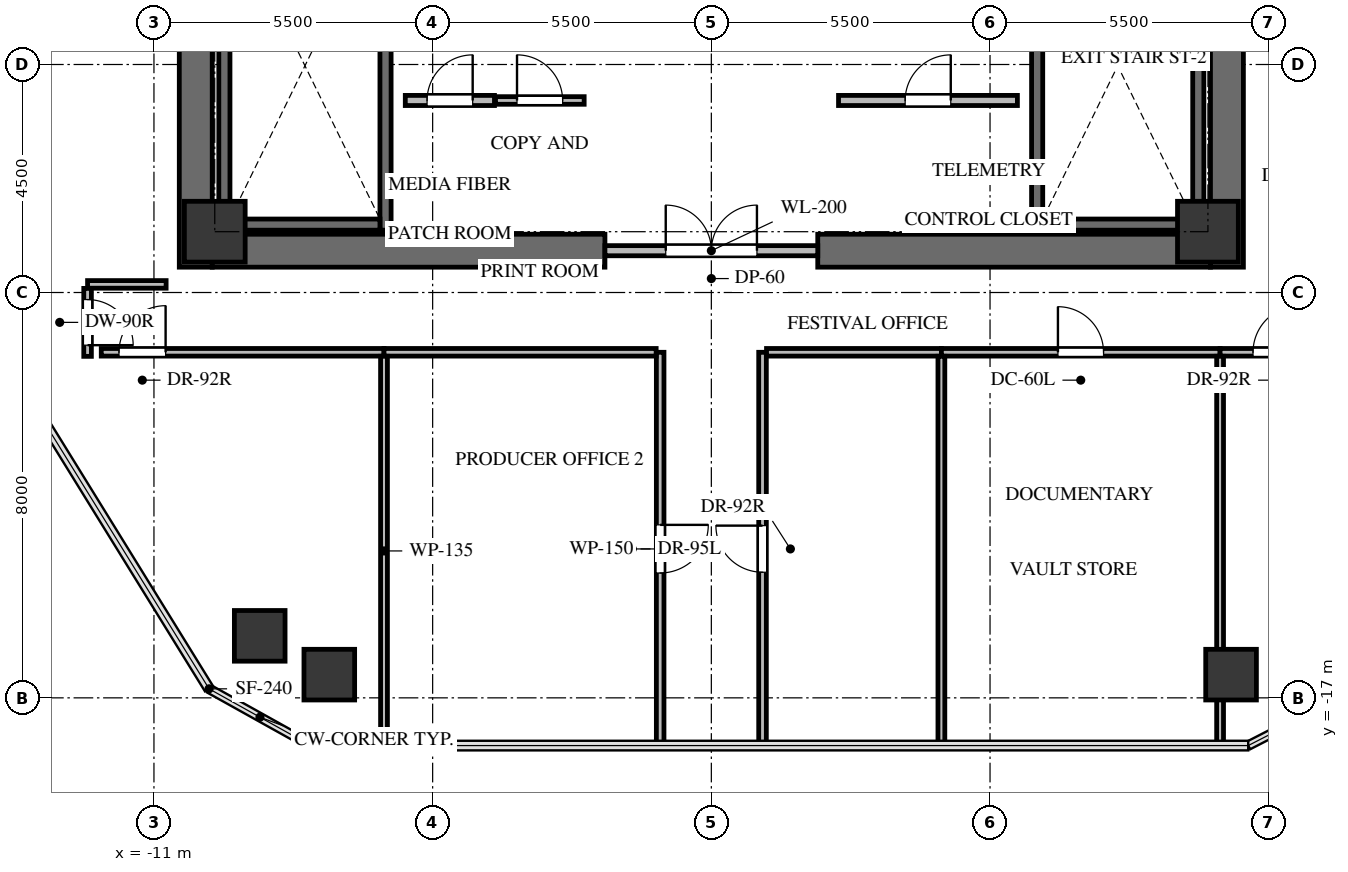
"""IFC4 building model, lengths in metres.
Left out: names, types, materials, properties, quantities, classifications, styles, units other than length and angle.
Written with IfcOpenShell. Run it as: python <this file> out.ifc"""

import sys

from ifc_helpers import new_model, si_unit, direction, frame, frame_2d, origin, origin_2d, place, context, subcontext, project, spatial, rectangle, extrude, source, transform, mapped, element, fill, save


model = new_model("IFC4")
c1 = context("Model", 3, precision=1e-05, world=origin(), true_north=direction((0.0, 1.0)))
c2 = subcontext(c1, "Body", "Model", "MODEL_VIEW")
j1 = project(units=[si_unit("LENGTHUNIT", "METRE"), si_unit("PLANEANGLEUNIT", "RADIAN")], contexts=[c1])
p1 = place(None, origin())
s1 = spatial("IfcSite", under=j1, at=p1, CompositionType="ELEMENT")
p2 = place(p1, origin())
s2 = spatial("IfcBuilding", under=s1, at=p2, CompositionType="ELEMENT")
p3 = place(p2, frame((0.0, 0.0, 180.4)))
s3 = spatial("IfcBuildingStorey", under=s2, at=p3, CompositionType="ELEMENT", Elevation=180.4)
for number, where, z_axis, x_axis in (
    (1, (-10.175, -8.5, 0.0), (0.0, 0.0, 1.0), (0.0, 1.0, 0.0)),
    (2, (10.175, -8.5, 0.0), (0.0, 0.0, 1.0), (0.0, 1.0, 0.0)),
):
    element("IfcWall", number, at=place(p3, frame(where, z_axis=z_axis, x_axis=x_axis)), inside=s3, PredefinedType="SHEAR", context=c2, shape_type="SweptSolid", body=[
        extrude(rectangle(XDim=17.0, YDim=0.65, at=frame_2d((8.5, 0.0))), origin(), (0.0, 0.0, 1.0), 3.3),
    ])
for number, where, z_axis, x_axis in (
    (3, (-9.85, -8.175, 0.0), (0.0, 0.0, 1.0), (1.0, 0.0, 0.0)),
    (4, (2.1, -8.175, 0.0), (0.0, 0.0, 1.0), (1.0, 0.0, 0.0)),
):
    element("IfcWall", number, at=place(p3, frame(where, z_axis=z_axis, x_axis=x_axis)), inside=s3, PredefinedType="SHEAR", context=c2, shape_type="SweptSolid", body=[
        extrude(rectangle(XDim=7.75, YDim=0.65, at=frame_2d((3.875, 0.0))), origin(), (0.0, 0.0, 1.0), 3.3),
    ])
p4 = place(p3, frame((-6.43, -7.77, -0.24), z_axis=(0.0, 0.0, 1.0), x_axis=(0.0, 1.0, 0.0)))
e5 = element("IfcWall", 5, at=p4, inside=s3, PredefinedType="SHEAR", context=c2, shape_type="SweptSolid", body=[
    extrude(rectangle(XDim=7.89, YDim=0.22, at=frame_2d((3.945, 0.0))), origin(), (0.0, 0.0, 1.0), 3.3),
])
p5 = place(p4, frame((6.32, 0.0, 0.0)))
e6 = element("IfcOpeningElement", 6, at=p5, cuts=e5, PredefinedType="OPENING", context=c2, shape_type="SweptSolid", body=[
    extrude(rectangle(XDim=1.05, YDim=2.15, at=frame_2d((0.525, 1.075))), frame((0.0, 0.12, 0.0), z_axis=(0.0, -1.0, 0.0), x_axis=(1.0, 0.0, 0.0)), (0.0, 0.0, 1.0), 0.24),
])
p6 = place(p3, frame((-9.61, 0.12, -0.24), z_axis=(0.0, 0.0, 1.0), x_axis=(0.0, -1.0, 0.0)))
e7 = element("IfcWall", 7, at=p6, inside=s3, PredefinedType="SHEAR", context=c2, shape_type="SweptSolid", body=[
    extrude(rectangle(XDim=7.89, YDim=0.22, at=frame_2d((3.945, 0.0))), origin(), (0.0, 0.0, 1.0), 3.3),
])
p7 = place(p3, frame((-9.5, -7.66, -0.24), z_axis=(0.0, 0.0, 1.0), x_axis=(1.0, 0.0, 0.0)))
e8 = element("IfcWall", 8, at=p7, inside=s3, PredefinedType="SHEAR", context=c2, shape_type="SweptSolid", body=[
    extrude(rectangle(XDim=2.96, YDim=0.22, at=frame_2d((1.48, 0.0))), origin(), (0.0, 0.0, 1.0), 3.3),
])
p8 = place(p3, frame((9.61, -7.77, -0.24), z_axis=(0.0, 0.0, 1.0), x_axis=(0.0, 1.0, 0.0)))
e9 = element("IfcWall", 9, at=p8, inside=s3, PredefinedType="SHEAR", context=c2, shape_type="SweptSolid", body=[
    extrude(rectangle(XDim=7.89, YDim=0.22, at=frame_2d((3.945, 0.0))), origin(), (0.0, 0.0, 1.0), 3.3),
])
p9 = place(p3, frame((6.43, 0.12, -0.24), z_axis=(0.0, 0.0, 1.0), x_axis=(0.0, -1.0, 0.0)))
e10 = element("IfcWall", 10, at=p9, inside=s3, PredefinedType="SHEAR", context=c2, shape_type="SweptSolid", body=[
    extrude(rectangle(XDim=7.89, YDim=0.22, at=frame_2d((3.945, 0.0))), origin(), (0.0, 0.0, 1.0), 3.3),
])
p10 = place(p9, frame((0.52, 0.0, 0.0)))
e11 = element("IfcOpeningElement", 11, at=p10, cuts=e10, PredefinedType="OPENING", context=c2, shape_type="SweptSolid", body=[
    extrude(rectangle(XDim=1.05, YDim=2.15, at=frame_2d((0.525, 1.075))), frame((0.0, 0.12, 0.0), z_axis=(0.0, -1.0, 0.0), x_axis=(1.0, 0.0, 0.0)), (0.0, 0.0, 1.0), 0.24),
])
p11 = place(p3, frame((6.54, -7.66, -0.24), z_axis=(0.0, 0.0, 1.0), x_axis=(1.0, 0.0, 0.0)))
e12 = element("IfcWall", 12, at=p11, inside=s3, PredefinedType="SHEAR", context=c2, shape_type="SweptSolid", body=[
    extrude(rectangle(XDim=2.96, YDim=0.22, at=frame_2d((1.48, 0.0))), origin(), (0.0, 0.0, 1.0), 3.3),
])
m1 = source(origin(), c2, "Body", "SweptSolid", [
    extrude(rectangle(XDim=1.2, YDim=1.2, at=origin_2d()), origin(), (0.0, 0.0, 1.0), 3.3),
])
for number, where, z_axis, x_axis in (
    (13, (-9.8, -7.8, -0.24), (0.0, 0.0, 1.0), (1.0, 0.0, 0.0)),
    (14, (9.8, -7.8, -0.24), (0.0, 0.0, 1.0), (1.0, 0.0, 0.0)),
):
    element("IfcColumn", number, at=place(p3, frame(where, z_axis=z_axis, x_axis=x_axis)), inside=s3, PredefinedType="COLUMN", context=c2, shape_type="MappedRepresentation", body=[
        mapped(m1, transform((0.0, 0.0, 0.0), x_axis=(1.0, 0.0, 0.0), y_axis=(0.0, 1.0, 0.0), z_axis=(0.0, 0.0, 1.0), scale=1.0)),
    ])
m2 = source(origin(), c2, "Body", "SweptSolid", [
    extrude(rectangle(XDim=1.0, YDim=1.0, at=origin_2d()), origin(), (0.0, 0.0, 1.0), 3.3),
])
for number, where, z_axis, x_axis in (
    (15, (-8.913, -15.776, -0.24), (0.0, 0.0, 1.0), (1.0, 0.0, 0.0)),
    (16, (10.257, -16.542, -0.24), (0.0, 0.0, 1.0), (1.0, 0.0, 0.0)),
    (17, (-7.54, -16.542, -0.24), (0.0, 0.0, 1.0), (1.0, 0.0, 0.0)),
):
    element("IfcColumn", number, at=place(p3, frame(where, z_axis=z_axis, x_axis=x_axis)), inside=s3, PredefinedType="COLUMN", context=c2, shape_type="MappedRepresentation", body=[
        mapped(m2, transform((0.0, 0.0, 0.0), x_axis=(1.0, 0.0, 0.0), y_axis=(0.0, 1.0, 0.0), z_axis=(0.0, 0.0, 1.0), scale=1.0)),
    ])
p12 = place(p3, frame((-2.1, -8.175, 0.0), z_axis=(0.0, 0.0, 1.0), x_axis=(1.0, 0.0, 0.0)))
e18 = element("IfcWall", 18, at=p12, inside=s3, PredefinedType="SOLIDWALL", context=c2, shape_type="SweptSolid", body=[
    extrude(rectangle(XDim=4.2, YDim=0.2, at=frame_2d((2.1, 0.0))), origin(), (0.0, 0.0, 1.0), 3.045),
])
p13 = place(p12, frame((1.2, 0.0, 0.0)))
e19 = element("IfcOpeningElement", 19, at=p13, cuts=e18, PredefinedType="OPENING", context=c2, shape_type="SweptSolid", body=[
    extrude(rectangle(XDim=1.8, YDim=2.15, at=frame_2d((0.9, 1.075))), frame((0.0, 0.11, 0.0), z_axis=(0.0, -1.0, 0.0), x_axis=(1.0, 0.0, 0.0)), (0.0, 0.0, 1.0), 0.22),
])
p14 = place(p3, frame((-6.04, -5.21, 0.0), z_axis=(0.0, 0.0, 1.0), x_axis=(1.0, 0.0, 0.0)))
e20 = element("IfcWall", 20, at=p14, inside=s3, PredefinedType="SOLIDWALL", context=c2, shape_type="SweptSolid", body=[
    extrude(rectangle(XDim=1.76, YDim=0.2, at=frame_2d((0.88, 0.0))), origin(), (0.0, 0.0, 1.0), 3.045),
])
p15 = place(p14, frame((0.43, 0.0, 0.0)))
e21 = element("IfcOpeningElement", 21, at=p15, cuts=e20, PredefinedType="OPENING", context=c2, shape_type="SweptSolid", body=[
    extrude(rectangle(XDim=0.9, YDim=2.05, at=frame_2d((0.45, 1.025))), frame((0.0, 0.11, 0.0), z_axis=(0.0, -1.0, 0.0), x_axis=(1.0, 0.0, 0.0)), (0.0, 0.0, 1.0), 0.22),
])
p16 = place(p3, frame((-4.26, -5.21, 0.0), z_axis=(0.0, 0.0, 1.0), x_axis=(1.0, 0.0, 0.0)))
e22 = element("IfcWall", 22, at=p16, inside=s3, PredefinedType="PARTITIONING", context=c2, shape_type="SweptSolid", body=[
    extrude(rectangle(XDim=1.75, YDim=0.15, at=frame_2d((0.875, 0.0))), origin(), (0.0, 0.0, 1.0), 3.045),
])
p17 = place(p16, frame((0.425, 0.0, 0.0)))
e23 = element("IfcOpeningElement", 23, at=p17, cuts=e22, PredefinedType="OPENING", context=c2, shape_type="SweptSolid", body=[
    extrude(rectangle(XDim=0.9, YDim=2.05, at=frame_2d((0.45, 1.025))), frame((0.0, 0.085, 0.0), z_axis=(0.0, -1.0, 0.0), x_axis=(1.0, 0.0, 0.0)), (0.0, 0.0, 1.0), 0.17),
])
p18 = place(p3, frame((2.51, -5.21, 0.0), z_axis=(0.0, 0.0, 1.0), x_axis=(1.0, 0.0, 0.0)))
e24 = element("IfcWall", 24, at=p18, inside=s3, PredefinedType="SOLIDWALL", context=c2, shape_type="SweptSolid", body=[
    extrude(rectangle(XDim=3.53, YDim=0.2, at=frame_2d((1.765, 0.0))), origin(), (0.0, 0.0, 1.0), 3.045),
])
p19 = place(p18, frame((1.315, 0.0, 0.0)))
e25 = element("IfcOpeningElement", 25, at=p19, cuts=e24, PredefinedType="OPENING", context=c2, shape_type="SweptSolid", body=[
    extrude(rectangle(XDim=0.9, YDim=2.05, at=frame_2d((0.45, 1.025))), frame((0.0, 0.11, 0.0), z_axis=(0.0, -1.0, 0.0), x_axis=(1.0, 0.0, 0.0)), (0.0, 0.0, 1.0), 0.22),
])
p20 = place(p3, frame((-12.04, -10.18, 0.0), z_axis=(0.0, 0.0, 1.0), x_axis=(1.0, 0.0, 0.0)))
e26 = element("IfcWall", 26, at=p20, inside=s3, PredefinedType="PARTITIONING", context=c2, shape_type="SweptSolid", body=[
    extrude(rectangle(XDim=5.58, YDim=0.15, at=frame_2d((2.79, 0.0))), origin(), (0.0, 0.0, 1.0), 3.045),
])
p21 = place(p20, frame((0.35, 0.0, 0.0)))
e27 = element("IfcOpeningElement", 27, at=p21, cuts=e26, PredefinedType="OPENING", context=c2, shape_type="SweptSolid", body=[
    extrude(rectangle(XDim=0.92, YDim=2.1, at=frame_2d((0.46, 1.05))), frame((0.0, 0.085, 0.0), z_axis=(0.0, -1.0, 0.0), x_axis=(1.0, 0.0, 0.0)), (0.0, 0.0, 1.0), 0.17),
])
p22 = place(p3, frame((-1.01, -10.18, 0.0), z_axis=(0.0, 0.0, 1.0), x_axis=(0.0, -1.0, 0.0)))
e28 = element("IfcWall", 28, at=p22, inside=s3, PredefinedType="PARTITIONING", context=c2, shape_type="SweptSolid", body=[
    extrude(rectangle(XDim=7.762, YDim=0.15, at=frame_2d((3.881, 0.0))), origin(), (0.0, 0.0, 1.0), 2.399),
])
p23 = place(p22, frame((3.406, 0.0, 0.0)))
e29 = element("IfcOpeningElement", 29, at=p23, cuts=e28, PredefinedType="OPENING", context=c2, shape_type="SweptSolid", body=[
    extrude(rectangle(XDim=0.95, YDim=2.1, at=frame_2d((0.475, 1.05))), frame((0.0, 0.085, 0.0), z_axis=(0.0, -1.0, 0.0), x_axis=(1.0, 0.0, 0.0)), (0.0, 0.0, 1.0), 0.17),
])
p24 = place(p3, frame((-6.46, -10.18, 0.0), z_axis=(0.0, 0.0, 1.0), x_axis=(1.0, 0.0, 0.0)))
e30 = element("IfcWall", 30, at=p24, inside=s3, PredefinedType="PARTITIONING", context=c2, shape_type="SweptSolid", body=[
    extrude(rectangle(XDim=5.371, YDim=0.15, at=frame_2d((2.686, 0.0))), origin(), (0.0, 0.0, 1.0), 2.242),
])
p25 = place(p3, frame((1.01, -17.942, 0.0), z_axis=(0.0, 0.0, 1.0), x_axis=(0.0, 1.0, 0.0)))
e31 = element("IfcWall", 31, at=p25, inside=s3, PredefinedType="PARTITIONING", context=c2, shape_type="SweptSolid", body=[
    extrude(rectangle(XDim=7.762, YDim=0.15, at=frame_2d((3.881, 0.0))), origin(), (0.0, 0.0, 1.0), 2.399),
])
p26 = place(p25, frame((3.421, 0.0, 0.0)))
e32 = element("IfcOpeningElement", 32, at=p26, cuts=e31, PredefinedType="OPENING", context=c2, shape_type="SweptSolid", body=[
    extrude(rectangle(XDim=0.92, YDim=2.1, at=frame_2d((0.46, 1.05))), frame((0.0, 0.085, 0.0), z_axis=(0.0, -1.0, 0.0), x_axis=(1.0, 0.0, 0.0)), (0.0, 0.0, 1.0), 0.17),
])
p27 = place(p3, frame((1.089, -10.18, 0.0), z_axis=(0.0, 0.0, 1.0), x_axis=(1.0, 0.0, 0.0)))
e33 = element("IfcWall", 33, at=p27, inside=s3, PredefinedType="PARTITIONING", context=c2, shape_type="SweptSolid", body=[
    extrude(rectangle(XDim=3.451, YDim=0.15, at=frame_2d((1.726, 0.0))), origin(), (0.0, 0.0, 1.0), 2.242),
])
p28 = place(p3, frame((4.54, -10.18, 0.0), z_axis=(0.0, 0.0, 1.0), x_axis=(1.0, 0.0, 0.0)))
e34 = element("IfcWall", 34, at=p28, inside=s3, PredefinedType="PARTITIONING", context=c2, shape_type="SweptSolid", body=[
    extrude(rectangle(XDim=5.5, YDim=0.15, at=frame_2d((2.75, 0.0))), origin(), (0.0, 0.0, 1.0), 2.242),
])
p29 = place(p28, frame((2.3, 0.0, 0.0)))
e35 = element("IfcOpeningElement", 35, at=p29, cuts=e34, PredefinedType="OPENING", context=c2, shape_type="SweptSolid", body=[
    extrude(rectangle(XDim=0.9, YDim=2.05, at=frame_2d((0.45, 1.025))), frame((0.0, 0.085, 0.0), z_axis=(0.0, -1.0, 0.0), x_axis=(1.0, 0.0, 0.0)), (0.0, 0.0, 1.0), 0.17),
])
p30 = place(p3, frame((10.04, -10.18, 0.0), z_axis=(0.0, 0.0, 1.0), x_axis=(1.0, 0.0, 0.0)))
e36 = element("IfcWall", 36, at=p30, inside=s3, PredefinedType="PARTITIONING", context=c2, shape_type="SweptSolid", body=[
    extrude(rectangle(XDim=2.22, YDim=0.15, at=frame_2d((1.11, 0.0))), origin(), (0.0, 0.0, 1.0), 3.045),
])
p31 = place(p30, frame((0.65, 0.0, 0.0)))
e37 = element("IfcOpeningElement", 37, at=p31, cuts=e36, PredefinedType="OPENING", context=c2, shape_type="SweptSolid", body=[
    extrude(rectangle(XDim=0.92, YDim=2.1, at=frame_2d((0.46, 1.05))), frame((0.0, 0.085, 0.0), z_axis=(0.0, -1.0, 0.0), x_axis=(1.0, 0.0, 0.0)), (0.0, 0.0, 1.0), 0.17),
])
p32 = place(p3, frame((-10.76, -8.84, 0.0), z_axis=(0.0, 0.0, 1.0), x_axis=(-1.0, 0.0, 0.0)))
e38 = element("IfcWall", 38, at=p32, inside=s3, PredefinedType="PARTITIONING", context=c2, shape_type="SweptSolid", body=[
    extrude(rectangle(XDim=1.55, YDim=0.15, at=frame_2d((0.775, 0.0))), origin(), (0.0, 0.0, 1.0), 3.045),
])
p33 = place(p3, frame((-12.31, -8.919, 0.0), z_axis=(0.0, 0.0, 1.0), x_axis=(0.0, -1.0, 0.0)))
e39 = element("IfcWall", 39, at=p33, inside=s3, PredefinedType="PARTITIONING", context=c2, shape_type="SweptSolid", body=[
    extrude(rectangle(XDim=1.341, YDim=0.15, at=frame_2d((0.67, 0.0))), origin(), (0.0, 0.0, 1.0), 2.399),
])
p34 = place(p33, frame((0.22, 0.0, 0.0)))
e40 = element("IfcOpeningElement", 40, at=p34, cuts=e39, PredefinedType="OPENING", context=c2, shape_type="SweptSolid", body=[
    extrude(rectangle(XDim=0.9, YDim=2.05, at=frame_2d((0.45, 1.025))), frame((0.0, 0.085, 0.0), z_axis=(0.0, -1.0, 0.0), x_axis=(1.0, 0.0, 0.0)), (0.0, 0.0, 1.0), 0.17),
])
p35 = place(p3, frame((-6.46, -10.259, 0.0), z_axis=(0.0, 0.0, 1.0), x_axis=(0.0, -1.0, 0.0)))
e41 = element("IfcWall", 41, at=p35, inside=s3, PredefinedType="PARTITIONING", context=c2, shape_type="SweptSolid", body=[
    extrude(rectangle(XDim=7.683, YDim=0.135, at=frame_2d((3.841, 0.0))), origin(), (0.0, 0.0, 1.0), 2.242),
])
p36 = place(p3, frame((4.54, -10.259, 0.0), z_axis=(0.0, 0.0, 1.0), x_axis=(0.0, -1.0, 0.0)))
e42 = element("IfcWall", 42, at=p36, inside=s3, PredefinedType="PARTITIONING", context=c2, shape_type="SweptSolid", body=[
    extrude(rectangle(XDim=7.683, YDim=0.135, at=frame_2d((3.841, 0.0))), origin(), (0.0, 0.0, 1.0), 2.399),
])
p37 = place(p3, frame((10.04, -10.259, 0.0), z_axis=(0.0, 0.0, 1.0), x_axis=(0.0, -1.0, 0.0)))
e43 = element("IfcWall", 43, at=p37, inside=s3, PredefinedType="PARTITIONING", context=c2, shape_type="SweptSolid", body=[
    extrude(rectangle(XDim=6.367, YDim=0.135, at=frame_2d((3.184, 0.0))), origin(), (0.0, 0.0, 1.0), 2.242),
])
p38 = place(p3, frame((10.04, -16.626, 0.0), z_axis=(0.0, 0.0, 1.0), x_axis=(0.0, -1.0, 0.0)))
e44 = element("IfcWall", 44, at=p38, inside=s3, PredefinedType="PARTITIONING", context=c2, shape_type="SweptSolid", body=[
    extrude(rectangle(XDim=1.316, YDim=0.135, at=frame_2d((0.658, 0.0))), origin(), (0.0, 0.0, 1.0), 1.877),
])
m3 = source(origin(), c2, "Body", "SweptSolid", [
    extrude(rectangle(XDim=1.8, YDim=2.15, at=frame_2d((0.9, 1.075))), frame((0.0, 0.025, 0.0), z_axis=(0.0, -1.0, 0.0), x_axis=(1.0, 0.0, 0.0)), (0.0, 0.0, 1.0), 0.05),
])
p39 = place(p13, origin())
e45 = element("IfcDoor", 45, at=p39, inside=s3, OperationType="DOUBLE_DOOR_SINGLE_SWING", PredefinedType="DOOR", context=c2, shape_type="MappedRepresentation", body=[
    mapped(m3, transform((0.0, 0.0, 0.0), x_axis=(1.0, 0.0, 0.0), y_axis=(0.0, 1.0, 0.0), z_axis=(0.0, 0.0, 1.0), scale=1.0)),
])
fill(e19, e45)
m4 = source(origin(), c2, "Body", "SweptSolid", [
    extrude(rectangle(XDim=0.9, YDim=2.05, at=frame_2d((0.45, 1.025))), frame((0.0, 0.025, 0.0), z_axis=(0.0, -1.0, 0.0), x_axis=(1.0, 0.0, 0.0)), (0.0, 0.0, 1.0), 0.05),
])
p40 = place(p15, origin())
e46 = element("IfcDoor", 46, at=p40, inside=s3, OperationType="SINGLE_SWING_RIGHT", PredefinedType="DOOR", context=c2, shape_type="MappedRepresentation", body=[
    mapped(m4, transform((0.0, 0.0, 0.0), x_axis=(1.0, 0.0, 0.0), y_axis=(0.0, 1.0, 0.0), z_axis=(0.0, 0.0, 1.0), scale=1.0)),
])
fill(e21, e46)
m5 = source(origin(), c2, "Body", "SweptSolid", [
    extrude(rectangle(XDim=0.9, YDim=2.05, at=frame_2d((0.45, 1.025))), frame((0.0, 0.025, 0.0), z_axis=(0.0, -1.0, 0.0), x_axis=(1.0, 0.0, 0.0)), (0.0, 0.0, 1.0), 0.05),
])
p41 = place(p17, origin())
e47 = element("IfcDoor", 47, at=p41, inside=s3, OperationType="SINGLE_SWING_LEFT", PredefinedType="DOOR", context=c2, shape_type="MappedRepresentation", body=[
    mapped(m5, transform((0.0, 0.0, 0.0), x_axis=(1.0, 0.0, 0.0), y_axis=(0.0, 1.0, 0.0), z_axis=(0.0, 0.0, 1.0), scale=1.0)),
])
fill(e23, e47)
p42 = place(p19, origin())
e48 = element("IfcDoor", 48, at=p42, inside=s3, OperationType="SINGLE_SWING_RIGHT", PredefinedType="DOOR", context=c2, shape_type="MappedRepresentation", body=[
    mapped(m4, transform((0.0, 0.0, 0.0), x_axis=(1.0, 0.0, 0.0), y_axis=(0.0, 1.0, 0.0), z_axis=(0.0, 0.0, 1.0), scale=1.0)),
])
fill(e25, e48)
m6 = source(origin(), c2, "Body", "SweptSolid", [
    extrude(rectangle(XDim=0.92, YDim=2.1, at=frame_2d((0.46, 1.05))), frame((0.0, 0.025, 0.0), z_axis=(0.0, -1.0, 0.0), x_axis=(1.0, 0.0, 0.0)), (0.0, 0.0, 1.0), 0.05),
])
p43 = place(p21, origin())
e49 = element("IfcDoor", 49, at=p43, inside=s3, OperationType="SINGLE_SWING_RIGHT", PredefinedType="DOOR", context=c2, shape_type="MappedRepresentation", body=[
    mapped(m6, transform((0.0, 0.0, 0.0), x_axis=(1.0, 0.0, 0.0), y_axis=(0.0, 1.0, 0.0), z_axis=(0.0, 0.0, 1.0), scale=1.0)),
])
fill(e27, e49)
m7 = source(origin(), c2, "Body", "SweptSolid", [
    extrude(rectangle(XDim=0.95, YDim=2.1, at=frame_2d((0.475, 1.05))), frame((0.0, 0.025, 0.0), z_axis=(0.0, -1.0, 0.0), x_axis=(1.0, 0.0, 0.0)), (0.0, 0.0, 1.0), 0.05),
])
p44 = place(p23, origin())
e50 = element("IfcDoor", 50, at=p44, inside=s3, OperationType="SINGLE_SWING_LEFT", PredefinedType="DOOR", context=c2, shape_type="MappedRepresentation", body=[
    mapped(m7, transform((0.0, 0.0, 0.0), x_axis=(1.0, 0.0, 0.0), y_axis=(0.0, 1.0, 0.0), z_axis=(0.0, 0.0, 1.0), scale=1.0)),
])
fill(e29, e50)
p45 = place(p26, origin())
e51 = element("IfcDoor", 51, at=p45, inside=s3, OperationType="SINGLE_SWING_RIGHT", PredefinedType="DOOR", context=c2, shape_type="MappedRepresentation", body=[
    mapped(m6, transform((0.0, 0.0, 0.0), x_axis=(1.0, 0.0, 0.0), y_axis=(0.0, 1.0, 0.0), z_axis=(0.0, 0.0, 1.0), scale=1.0)),
])
fill(e32, e51)
p46 = place(p29, origin())
e52 = element("IfcDoor", 52, at=p46, inside=s3, OperationType="SINGLE_SWING_LEFT", PredefinedType="DOOR", context=c2, shape_type="MappedRepresentation", body=[
    mapped(m5, transform((0.0, 0.0, 0.0), x_axis=(1.0, 0.0, 0.0), y_axis=(0.0, 1.0, 0.0), z_axis=(0.0, 0.0, 1.0), scale=1.0)),
])
fill(e35, e52)
p47 = place(p31, origin())
e53 = element("IfcDoor", 53, at=p47, inside=s3, OperationType="SINGLE_SWING_RIGHT", PredefinedType="DOOR", context=c2, shape_type="MappedRepresentation", body=[
    mapped(m6, transform((0.0, 0.0, 0.0), x_axis=(1.0, 0.0, 0.0), y_axis=(0.0, 1.0, 0.0), z_axis=(0.0, 0.0, 1.0), scale=1.0)),
])
fill(e37, e53)
m8 = source(origin(), c2, "Body", "SweptSolid", [
    extrude(rectangle(XDim=0.9, YDim=2.05, at=frame_2d((0.45, 1.025))), frame((0.0, 0.025, 0.0), z_axis=(0.0, -1.0, 0.0), x_axis=(1.0, 0.0, 0.0)), (0.0, 0.0, 1.0), 0.05),
])
p48 = place(p34, origin())
e54 = element("IfcDoor", 54, at=p48, inside=s3, OperationType="SINGLE_SWING_RIGHT", PredefinedType="DOOR", context=c2, shape_type="MappedRepresentation", body=[
    mapped(m8, transform((0.0, 0.0, 0.0), x_axis=(1.0, 0.0, 0.0), y_axis=(0.0, 1.0, 0.0), z_axis=(0.0, 0.0, 1.0), scale=1.0)),
])
fill(e40, e54)
save(model, sys.argv[1])
